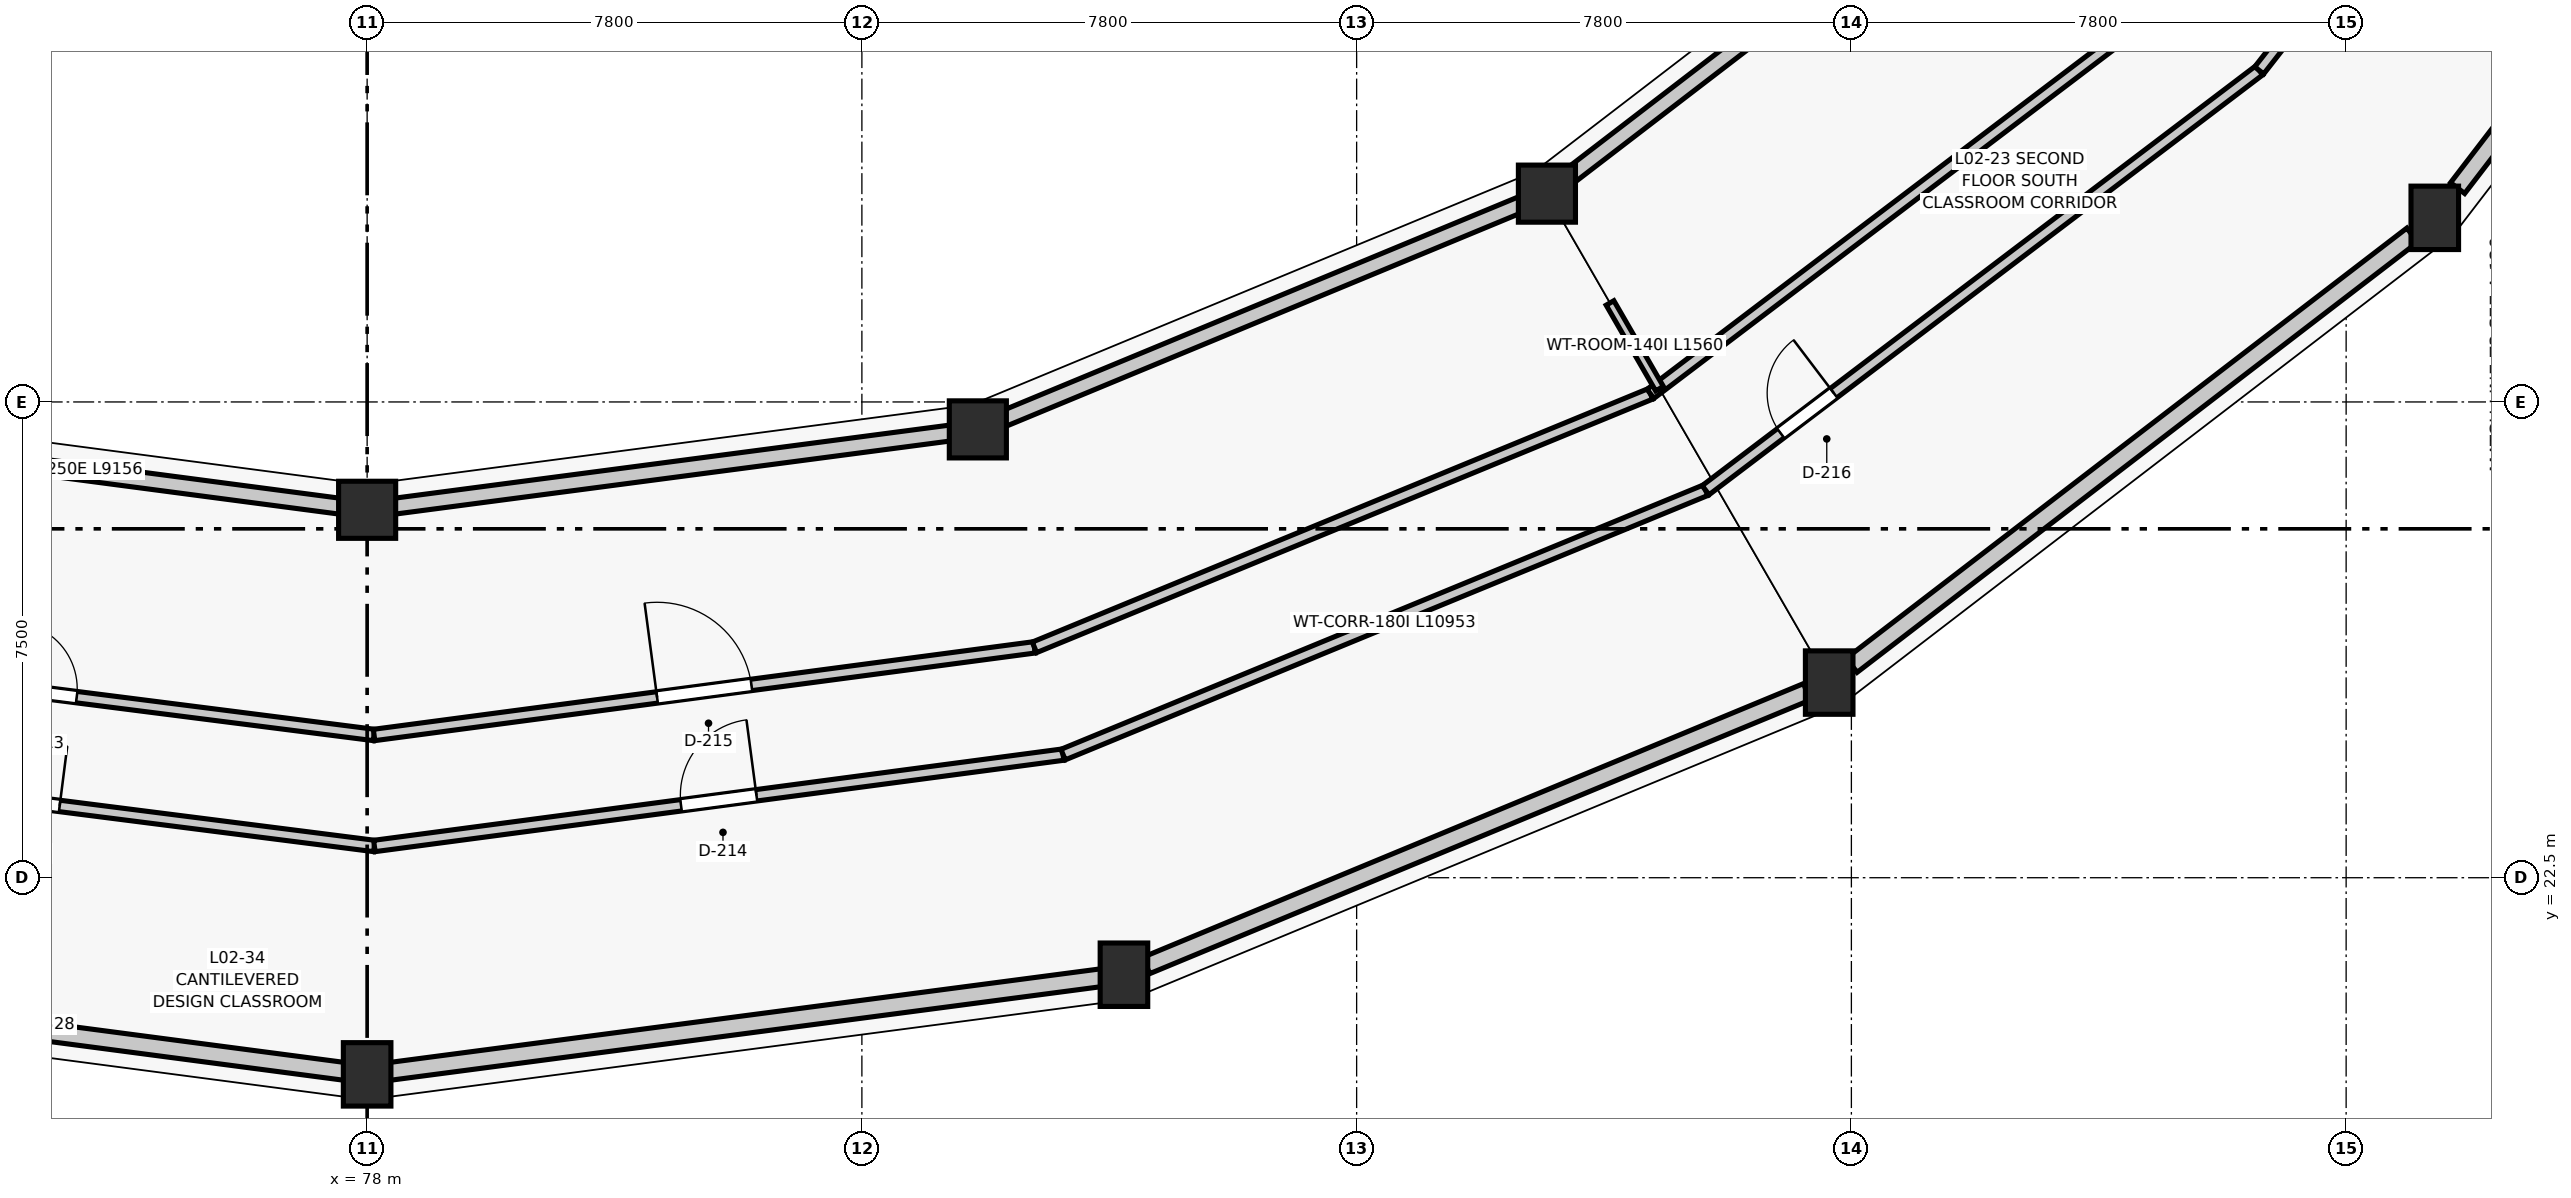
"""IFC4 building model, lengths in metres.
Left out: names, types, materials, properties, quantities, classifications, styles, units other than length and angle.
Written with IfcOpenShell. Run it as: python <this file> out.ifc"""

import sys

from ifc_helpers import new_model, si_unit, direction, frame, frame_2d, origin, origin_2d, place, context, subcontext, project, spatial, rectangle, circle, extrude, element, fill, save


model = new_model("IFC4")
c1 = context("Model", 3, precision=1e-05, world=origin(), true_north=direction((0.0, 1.0)))
c2 = subcontext(c1, "Body", "Model", "MODEL_VIEW")
j1 = project(units=[si_unit("LENGTHUNIT", "METRE"), si_unit("PLANEANGLEUNIT", "RADIAN")], contexts=[c1])
p1 = place(None, origin())
s1 = spatial("IfcSite", under=j1, at=p1, CompositionType="ELEMENT")
p2 = place(p1, origin())
s2 = spatial("IfcBuilding", under=s1, at=p2, CompositionType="ELEMENT")
p3 = place(p2, frame((0.0, 0.0, 8.7)))
s3 = spatial("IfcBuildingStorey", under=s2, at=p3, CompositionType="ELEMENT", Elevation=8.7)
p4 = place(p3, frame((87.628, 29.568, 0.0), z_axis=(0.0, 0.0, 1.0), x_axis=(1.0, 0.0, 0.0)))
e1 = element("IfcColumn", 1, at=p4, inside=s3, PredefinedType="COLUMN", context=c2, shape_type="SweptSolid", body=[
    extrude(circle(Radius=0.45, at=origin_2d()), origin(), (0.0, 0.0, 1.0), 3.9),
])
p5 = place(p3, frame((89.932, 20.971, 0.0), z_axis=(0.0, 0.0, 1.0), x_axis=(1.0, 0.0, 0.0)))
e2 = element("IfcColumn", 2, at=p5, inside=s3, PredefinedType="COLUMN", context=c2, shape_type="SweptSolid", body=[
    extrude(rectangle(XDim=0.75, YDim=1.0, at=origin_2d()), origin(), (0.0, 0.0, 1.0), 3.9),
])
p6 = place(p3, frame((78.0, 19.4, -0.34), z_axis=(0.0, 0.0, 1.0), x_axis=(1.0, 0.0, 0.0)))
e3 = element("IfcColumn", 3, at=p6, inside=s3, PredefinedType="COLUMN", context=c2, shape_type="SweptSolid", body=[
    extrude(rectangle(XDim=0.75, YDim=1.0, at=origin_2d()), origin(), (0.0, 0.0, 1.0), 4.24),
])
p7 = place(p3, frame((78.0, 28.3, -0.34), z_axis=(0.0, 0.0, 1.0), x_axis=(1.0, 0.0, 0.0)))
e4 = element("IfcColumn", 4, at=p7, inside=s3, PredefinedType="COLUMN", context=c2, shape_type="SweptSolid", body=[
    extrude(circle(Radius=0.45, at=origin_2d()), origin(), (0.0, 0.0, 1.0), 4.24),
])
p8 = place(p3, frame((101.05, 25.576, -0.34), z_axis=(0.0, 0.0, 1.0), x_axis=(1.0, 0.0, 0.0)))
e5 = element("IfcColumn", 5, at=p8, inside=s3, PredefinedType="COLUMN", context=c2, shape_type="SweptSolid", body=[
    extrude(rectangle(XDim=0.75, YDim=1.0, at=origin_2d()), origin(), (0.0, 0.0, 1.0), 4.24),
])
p9 = place(p3, frame((96.6, 33.284, -0.34), z_axis=(0.0, 0.0, 1.0), x_axis=(1.0, 0.0, 0.0)))
e6 = element("IfcColumn", 6, at=p9, inside=s3, PredefinedType="COLUMN", context=c2, shape_type="SweptSolid", body=[
    extrude(circle(Radius=0.45, at=origin_2d()), origin(), (0.0, 0.0, 1.0), 4.24),
])
p10 = place(p3, frame((110.598, 32.902, -0.34), z_axis=(0.0, 0.0, 1.0), x_axis=(1.0, 0.0, 0.0)))
e7 = element("IfcColumn", 7, at=p10, inside=s3, PredefinedType="COLUMN", context=c2, shape_type="SweptSolid", body=[
    extrude(rectangle(XDim=0.75, YDim=1.0, at=origin_2d()), origin(), (0.0, 0.0, 1.0), 4.24),
])
p11 = place(p3, frame((77.65, 19.446, 0.0), z_axis=(0.0, 0.0, 1.0), x_axis=(-0.991443215359, 0.130538694334, 0.0)))
e8 = element("IfcWall", 8, at=p11, inside=s3, PredefinedType="STANDARD", context=c2, shape_type="SweptSolid", body=[
    extrude(rectangle(XDim=11.328, YDim=0.28, at=frame_2d((5.664, 0.0))), origin(), (0.0, 0.0, 1.0), 2.706),
])
p12 = place(p3, frame((68.647, 29.531, 0.0), z_axis=(0.0, 0.0, 1.0), x_axis=(0.991441766434, -0.130549698469, 0.0)))
e9 = element("IfcWall", 9, at=p12, inside=s3, PredefinedType="STANDARD", context=c2, shape_type="SweptSolid", body=[
    extrude(rectangle(XDim=9.156, YDim=0.25, at=frame_2d((4.578, 0.0))), origin(), (0.0, 0.0, 1.0), 2.79),
])
p13 = place(p3, frame((89.581, 20.925, 0.0), z_axis=(0.0, 0.0, 1.0), x_axis=(-0.991443215359, -0.130538694334, 0.0)))
e10 = element("IfcWall", 10, at=p13, inside=s3, PredefinedType="STANDARD", context=c2, shape_type="SweptSolid", body=[
    extrude(rectangle(XDim=11.328, YDim=0.28, at=frame_2d((5.664, 0.0))), origin(), (0.0, 0.0, 1.0), 2.706),
])
p14 = place(p3, frame((78.275, 28.336, 0.0), z_axis=(0.0, 0.0, 1.0), x_axis=(0.991441766434, 0.130549698469, 0.0)))
e11 = element("IfcWall", 11, at=p14, inside=s3, PredefinedType="STANDARD", context=c2, shape_type="SweptSolid", body=[
    extrude(rectangle(XDim=9.156, YDim=0.25, at=frame_2d((4.578, 0.0))), origin(), (0.0, 0.0, 1.0), 2.79),
])
p15 = place(p3, frame((100.698, 25.43, 0.0), z_axis=(0.0, 0.0, 1.0), x_axis=(-0.923883530636, -0.382673779896, 0.0)))
e12 = element("IfcWall", 12, at=p15, inside=s3, PredefinedType="STANDARD", context=c2, shape_type="SweptSolid", body=[
    extrude(rectangle(XDim=11.272, YDim=0.28, at=frame_2d((5.636, 0.0))), origin(), (0.0, 0.0, 1.0), 2.706),
])
p16 = place(p3, frame((87.905, 29.682, 0.0), z_axis=(0.0, 0.0, 1.0), x_axis=(0.923880324771, 0.382681519675, 0.0)))
e13 = element("IfcWall", 13, at=p16, inside=s3, PredefinedType="STANDARD", context=c2, shape_type="SweptSolid", body=[
    extrude(rectangle(XDim=9.112, YDim=0.25, at=frame_2d((4.556, 0.0))), origin(), (0.0, 0.0, 1.0), 2.79),
])
p17 = place(p3, frame((110.242, 32.63, 0.0), z_axis=(0.0, 0.0, 1.0), x_axis=(-0.793342066679, -0.608776120785, 0.0)))
e14 = element("IfcWall", 14, at=p17, inside=s3, PredefinedType="STANDARD", context=c2, shape_type="SweptSolid", body=[
    extrude(rectangle(XDim=11.139, YDim=0.28, at=frame_2d((5.57, 0.0))), origin(), (0.0, 0.0, 1.0), 2.706),
])
p18 = place(p3, frame((96.88, 33.499, 0.0), z_axis=(0.0, 0.0, 1.0), x_axis=(0.793347085527, 0.608769580289, 0.0)))
e15 = element("IfcWall", 15, at=p18, inside=s3, PredefinedType="STANDARD", context=c2, shape_type="SweptSolid", body=[
    extrude(rectangle(XDim=9.005, YDim=0.25, at=frame_2d((4.502, 0.0))), origin(), (0.0, 0.0, 1.0), 2.79),
])
p19 = place(p3, frame((117.564, 41.981, 0.0), z_axis=(0.0, 0.0, 1.0), x_axis=(-0.608753590889, -0.79335935463, 0.0)))
e16 = element("IfcWall", 16, at=p19, inside=s3, PredefinedType="STANDARD", context=c2, shape_type="SweptSolid", body=[
    extrude(rectangle(XDim=10.852, YDim=0.28, at=frame_2d((5.426, 0.0))), origin(), (0.0, 0.0, 1.0), 2.706),
])
p20 = place(p3, frame((67.248, 24.382, 0.0), z_axis=(0.0, 0.0, 1.0), x_axis=(0.992007400361, -0.126179703713, 0.0)))
e17 = element("IfcWall", 17, at=p20, inside=s3, PredefinedType="PARTITIONING", context=c2, shape_type="SweptSolid", body=[
    extrude(rectangle(XDim=10.953, YDim=0.18, at=frame_2d((5.477, 0.0))), origin(), (0.0, 0.0, 1.0), 3.495),
])
p21 = place(p20, frame((5.002, 0.0, 0.0)))
e18 = element("IfcOpeningElement", 18, at=p21, cuts=e17, PredefinedType="OPENING", context=c2, shape_type="SweptSolid", body=[
    extrude(rectangle(XDim=0.95, YDim=2.1, at=frame_2d((0.475, 1.05))), frame((0.0, 0.1, 0.0), z_axis=(0.0, -1.0, 0.0), x_axis=(1.0, 0.0, 0.0)), (0.0, 0.0, 1.0), 0.2),
])
p22 = place(p3, frame((67.691, 26.075, 0.0), z_axis=(0.0, 0.0, 1.0), x_axis=(0.992004051173, -0.126206031772, 0.0)))
e19 = element("IfcWall", 19, at=p22, inside=s3, PredefinedType="PARTITIONING", context=c2, shape_type="SweptSolid", body=[
    extrude(rectangle(XDim=10.502, YDim=0.18, at=frame_2d((5.251, 0.0))), origin(), (0.0, 0.0, 1.0), 3.495),
])
p23 = place(p22, frame((4.726, 0.0, 0.0)))
e20 = element("IfcOpeningElement", 20, at=p23, cuts=e19, PredefinedType="OPENING", context=c2, shape_type="SweptSolid", body=[
    extrude(rectangle(XDim=1.05, YDim=2.1, at=frame_2d((0.525, 1.05))), frame((0.0, 0.1, 0.0), z_axis=(0.0, -1.0, 0.0), x_axis=(1.0, 0.0, 0.0)), (0.0, 0.0, 1.0), 0.2),
])
p24 = place(p3, frame((78.114, 23.0, 0.0), z_axis=(0.0, 0.0, 1.0), x_axis=(0.991312376735, 0.13152859663, 0.0)))
e21 = element("IfcWall", 21, at=p24, inside=s3, PredefinedType="PARTITIONING", context=c2, shape_type="SweptSolid", body=[
    extrude(rectangle(XDim=10.953, YDim=0.18, at=frame_2d((5.477, 0.0))), origin(), (0.0, 0.0, 1.0), 3.495),
])
p25 = place(p24, frame((4.877, 0.0, 0.0)))
e22 = element("IfcOpeningElement", 22, at=p25, cuts=e21, PredefinedType="OPENING", context=c2, shape_type="SweptSolid", body=[
    extrude(rectangle(XDim=1.2, YDim=2.15, at=frame_2d((0.6, 1.075))), frame((0.0, 0.1, 0.0), z_axis=(0.0, -1.0, 0.0), x_axis=(1.0, 0.0, 0.0)), (0.0, 0.0, 1.0), 0.2),
])
p26 = place(p3, frame((78.109, 24.75, 0.0), z_axis=(0.0, 0.0, 1.0), x_axis=(0.991309529126, 0.131550056874, 0.0)))
e23 = element("IfcWall", 23, at=p26, inside=s3, PredefinedType="PARTITIONING", context=c2, shape_type="SweptSolid", body=[
    extrude(rectangle(XDim=10.502, YDim=0.18, at=frame_2d((5.251, 0.0))), origin(), (0.0, 0.0, 1.0), 3.495),
])
p27 = place(p26, frame((4.501, 0.0, 0.0)))
e24 = element("IfcOpeningElement", 24, at=p27, cuts=e23, PredefinedType="OPENING", context=c2, shape_type="SweptSolid", body=[
    extrude(rectangle(XDim=1.5, YDim=2.15, at=frame_2d((0.75, 1.075))), frame((0.0, 0.1, 0.0), z_axis=(0.0, -1.0, 0.0), x_axis=(1.0, 0.0, 0.0)), (0.0, 0.0, 1.0), 0.2),
])
p28 = place(p3, frame((88.972, 24.441, 0.0), z_axis=(0.0, 0.0, 1.0), x_axis=(0.924781004089, 0.380499795633, 0.0)))
e25 = element("IfcWall", 25, at=p28, inside=s3, PredefinedType="PARTITIONING", context=c2, shape_type="SweptSolid", body=[
    extrude(rectangle(XDim=10.953, YDim=0.18, at=frame_2d((5.477, 0.0))), origin(), (0.0, 0.0, 1.0), 3.495),
])
p29 = place(p3, frame((88.521, 26.132, 0.0), z_axis=(0.0, 0.0, 1.0), x_axis=(0.924779649811, 0.380503087104, 0.0)))
e26 = element("IfcWall", 26, at=p29, inside=s3, PredefinedType="PARTITIONING", context=c2, shape_type="SweptSolid", body=[
    extrude(rectangle(XDim=10.502, YDim=0.18, at=frame_2d((5.251, 0.0))), origin(), (0.0, 0.0, 1.0), 3.495),
])
p30 = place(p3, frame((99.102, 28.609, 0.0), z_axis=(0.0, 0.0, 1.0), x_axis=(0.796819302805, 0.604217674913, 0.0)))
e27 = element("IfcWall", 27, at=p30, inside=s3, PredefinedType="PARTITIONING", context=c2, shape_type="SweptSolid", body=[
    extrude(rectangle(XDim=10.953, YDim=0.18, at=frame_2d((5.477, 0.0))), origin(), (0.0, 0.0, 1.0), 3.495),
])
p31 = place(p30, frame((1.486, 0.0, 0.0)))
e28 = element("IfcOpeningElement", 28, at=p31, cuts=e27, PredefinedType="OPENING", context=c2, shape_type="SweptSolid", body=[
    extrude(rectangle(XDim=1.05, YDim=2.1, at=frame_2d((0.525, 1.05))), frame((0.0, 0.1, 0.0), z_axis=(0.0, -1.0, 0.0), x_axis=(1.0, 0.0, 0.0)), (0.0, 0.0, 1.0), 0.2),
])
p32 = place(p3, frame((98.233, 30.128, 0.0), z_axis=(0.0, 0.0, 1.0), x_axis=(0.796817082488, 0.604220602971, 0.0)))
e29 = element("IfcWall", 29, at=p32, inside=s3, PredefinedType="PARTITIONING", context=c2, shape_type="SweptSolid", body=[
    extrude(rectangle(XDim=10.502, YDim=0.18, at=frame_2d((5.251, 0.0))), origin(), (0.0, 0.0, 1.0), 3.495),
])
p33 = place(p3, frame((107.829, 35.227, 0.0), z_axis=(0.0, 0.0, 1.0), x_axis=(0.615919602682, 0.787809014313, 0.0)))
e30 = element("IfcWall", 30, at=p33, inside=s3, PredefinedType="PARTITIONING", context=c2, shape_type="SweptSolid", body=[
    extrude(rectangle(XDim=5.828, YDim=0.18, at=frame_2d((2.914, 0.0))), origin(), (0.0, 0.0, 1.0), 3.495),
])
p34 = place(p3, frame((97.595, 31.561, 0.0), z_axis=(0.0, 0.0, 1.0), x_axis=(0.500042977895, -0.866000589063, 0.0)))
e31 = element("IfcWall", 31, at=p34, inside=s3, PredefinedType="PARTITIONING", context=c2, shape_type="SweptSolid", body=[
    extrude(rectangle(XDim=1.56, YDim=0.14, at=frame_2d((0.78, 0.0))), origin(), (0.0, 0.0, 1.0), 2.857),
])
p35 = place(p21, origin())
e32 = element("IfcDoor", 32, at=p35, inside=s3, OperationType="SINGLE_SWING_RIGHT", PredefinedType="DOOR", context=c2, shape_type="SweptSolid", body=[
    extrude(rectangle(XDim=0.95, YDim=2.1, at=frame_2d((0.475, 1.05))), frame((0.0, 0.025, 0.0), z_axis=(0.0, -1.0, 0.0), x_axis=(1.0, 0.0, 0.0)), (0.0, 0.0, 1.0), 0.05),
])
fill(e18, e32)
p36 = place(p23, origin())
e33 = element("IfcDoor", 33, at=p36, inside=s3, OperationType="SINGLE_SWING_LEFT", PredefinedType="DOOR", context=c2, shape_type="SweptSolid", body=[
    extrude(rectangle(XDim=1.05, YDim=2.1, at=frame_2d((0.525, 1.05))), frame((0.0, 0.025, 0.0), z_axis=(0.0, -1.0, 0.0), x_axis=(1.0, 0.0, 0.0)), (0.0, 0.0, 1.0), 0.05),
])
fill(e20, e33)
p37 = place(p25, origin())
e34 = element("IfcDoor", 34, at=p37, inside=s3, OperationType="SINGLE_SWING_RIGHT", PredefinedType="DOOR", context=c2, shape_type="SweptSolid", body=[
    extrude(rectangle(XDim=1.2, YDim=2.15, at=frame_2d((0.6, 1.075))), frame((0.0, 0.025, 0.0), z_axis=(0.0, -1.0, 0.0), x_axis=(1.0, 0.0, 0.0)), (0.0, 0.0, 1.0), 0.05),
])
fill(e22, e34)
p38 = place(p27, origin())
e35 = element("IfcDoor", 35, at=p38, inside=s3, OperationType="SINGLE_SWING_LEFT", PredefinedType="DOOR", context=c2, shape_type="SweptSolid", body=[
    extrude(rectangle(XDim=1.5, YDim=2.15, at=frame_2d((0.75, 1.075))), frame((0.0, 0.025, 0.0), z_axis=(0.0, -1.0, 0.0), x_axis=(1.0, 0.0, 0.0)), (0.0, 0.0, 1.0), 0.05),
])
fill(e24, e35)
p39 = place(p31, origin())
e36 = element("IfcDoor", 36, at=p39, inside=s3, OperationType="SINGLE_SWING_RIGHT", PredefinedType="DOOR", context=c2, shape_type="SweptSolid", body=[
    extrude(rectangle(XDim=1.05, YDim=2.1, at=frame_2d((0.525, 1.05))), frame((0.0, 0.025, 0.0), z_axis=(0.0, -1.0, 0.0), x_axis=(1.0, 0.0, 0.0)), (0.0, 0.0, 1.0), 0.05),
])
fill(e28, e36)
save(model, sys.argv[1])
